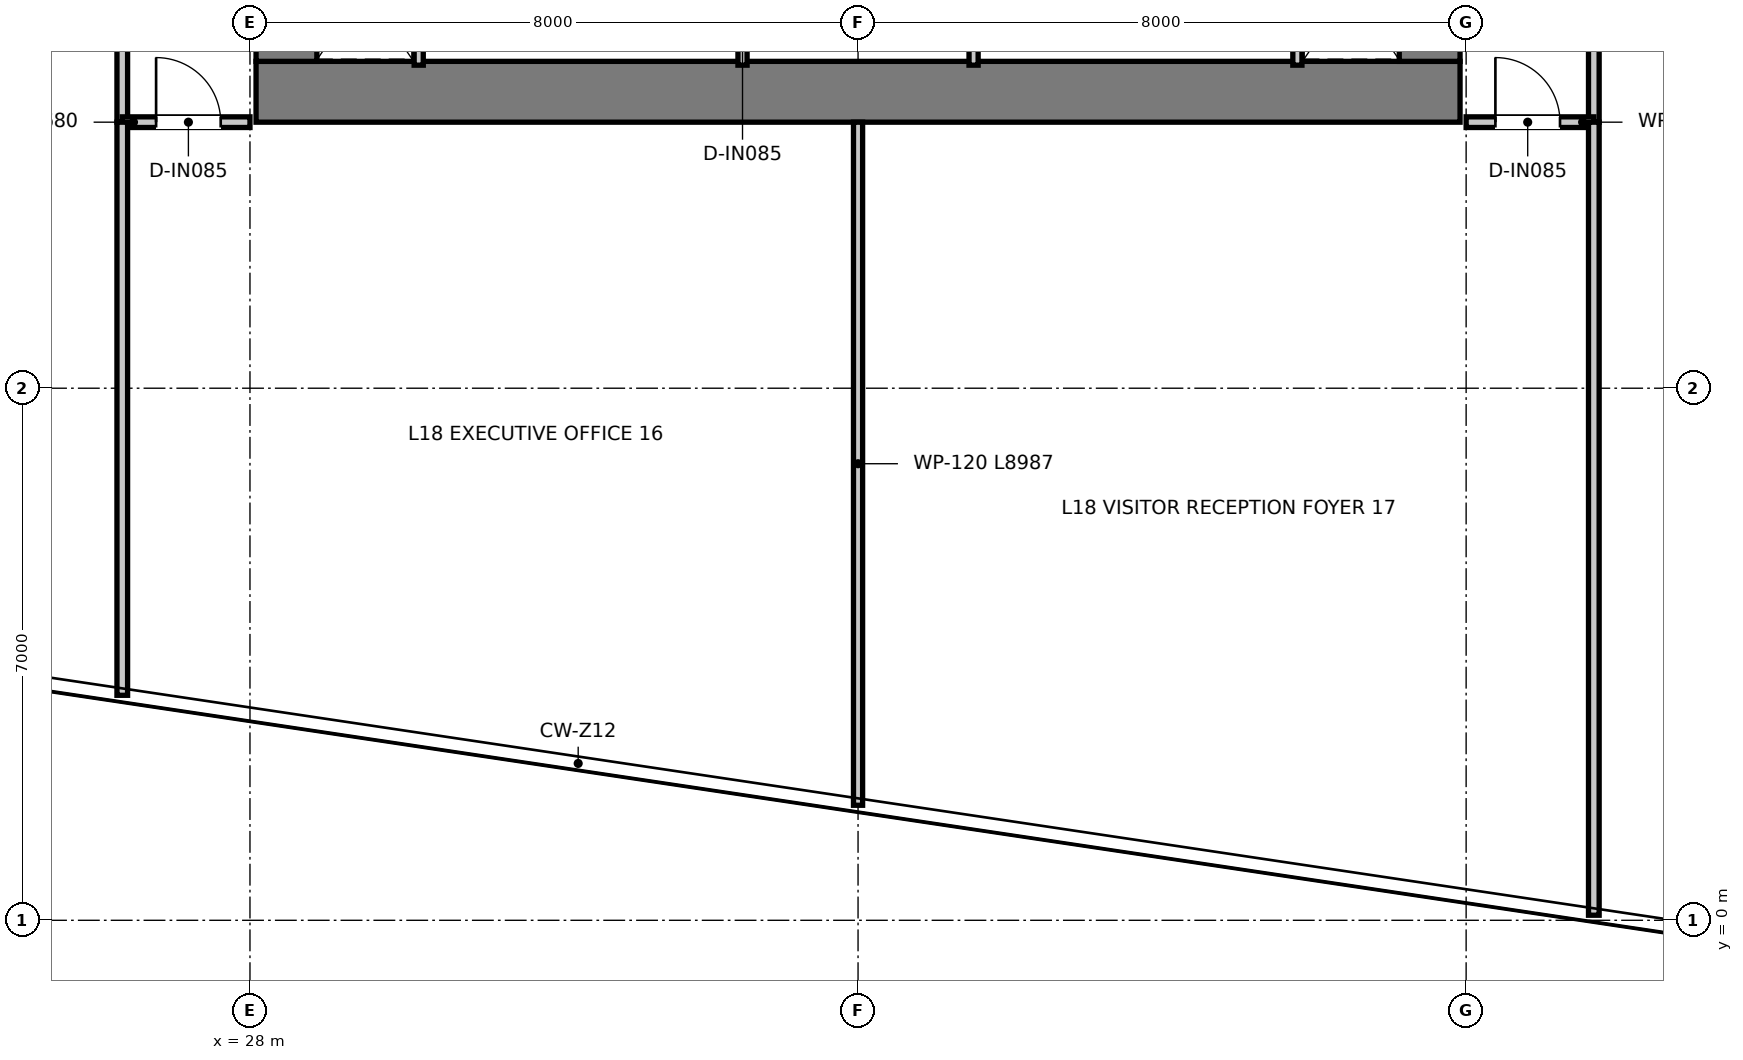
"""IFC4 building model, lengths in metres.
Left out: names, types, materials, properties, quantities, classifications, styles, units other than length and angle.
Written with IfcOpenShell. Run it as: python <this file> out.ifc"""

import sys

from ifc_helpers import new_model, si_unit, direction, frame, frame_2d, origin, place, context, subcontext, project, spatial, rectangle, extrude, element, fill, save


model = new_model("IFC4")
c1 = context("Model", 3, precision=1e-05, world=origin(), true_north=direction((0.0, 1.0)))
c2 = subcontext(c1, "Body", "Model", "MODEL_VIEW")
j1 = project(units=[si_unit("LENGTHUNIT", "METRE"), si_unit("PLANEANGLEUNIT", "RADIAN")], contexts=[c1])
p1 = place(None, origin())
s1 = spatial("IfcSite", under=j1, at=p1, CompositionType="ELEMENT")
p2 = place(p1, origin())
s2 = spatial("IfcBuilding", under=s1, at=p2, CompositionType="ELEMENT")
p3 = place(p2, frame((0.0, 0.0, 76.35)))
s3 = spatial("IfcBuildingStorey", under=s2, at=p3, CompositionType="ELEMENT", Elevation=76.35)
p4 = place(p3, frame((28.08, 10.9, 0.0), z_axis=(0.0, 0.0, 1.0), x_axis=(1.0, 0.0, 0.0)))
e1 = element("IfcWall", 1, at=p4, inside=s3, PredefinedType="SHEAR", context=c2, shape_type="SweptSolid", body=[
    extrude(rectangle(XDim=15.84, YDim=0.8, at=frame_2d((7.92, 0.0))), origin(), (0.0, 0.0, 1.0), 3.95),
])
for number, where, z_axis, x_axis in (
    (2, (28.48, 11.3, 0.0), (0.0, 0.0, 1.0), (0.0, 1.0, 0.0)),
    (3, (43.52, 11.3, 0.0), (0.0, 0.0, 1.0), (0.0, 1.0, 0.0)),
):
    element("IfcWall", number, at=place(p3, frame(where, z_axis=z_axis, x_axis=x_axis)), inside=s3, PredefinedType="SHEAR", context=c2, shape_type="SweptSolid", body=[
        extrude(rectangle(XDim=14.7, YDim=0.8, at=frame_2d((7.35, 0.0))), origin(), (0.0, 0.0, 1.0), 3.95),
    ])
for number, where, z_axis, x_axis in (
    (4, (30.22, 11.25, 0.0), (0.0, 0.0, 1.0), (0.0, 1.0, 0.0)),
    (5, (41.78, 11.25, 0.0), (0.0, 0.0, 1.0), (0.0, 1.0, 0.0)),
):
    element("IfcWall", number, at=place(p3, frame(where, z_axis=z_axis, x_axis=x_axis)), inside=s3, PredefinedType="PARTITIONING", context=c2, shape_type="SweptSolid", body=[
        extrude(rectangle(XDim=1.97, YDim=0.12, at=frame_2d((0.985, 0.0))), origin(), (0.0, 0.0, 1.0), 3.59),
    ])
p5 = place(p3, frame((34.48, 11.25, 0.0), z_axis=(0.0, 0.0, 1.0), x_axis=(0.0, 1.0, 0.0)))
e6 = element("IfcWall", 6, at=p5, inside=s3, PredefinedType="PARTITIONING", context=c2, shape_type="SweptSolid", body=[
    extrude(rectangle(XDim=1.97, YDim=0.12, at=frame_2d((0.985, 0.0))), origin(), (0.0, 0.0, 1.0), 3.59),
])
p6 = place(p5, frame((0.545, 0.0, 0.0)))
e7 = element("IfcOpeningElement", 7, at=p6, cuts=e6, PredefinedType="OPENING", context=c2, shape_type="SweptSolid", body=[
    extrude(rectangle(XDim=0.85, YDim=2.1, at=frame_2d((0.425, 1.05))), frame((0.0, 0.07, 0.0), z_axis=(0.0, -1.0, 0.0), x_axis=(1.0, 0.0, 0.0)), (0.0, 0.0, 1.0), 0.14),
])
p7 = place(p3, frame((37.52, 11.25, 0.0), z_axis=(0.0, 0.0, 1.0), x_axis=(0.0, 1.0, 0.0)))
e8 = element("IfcWall", 8, at=p7, inside=s3, PredefinedType="PARTITIONING", context=c2, shape_type="SweptSolid", body=[
    extrude(rectangle(XDim=1.97, YDim=0.12, at=frame_2d((0.985, 0.0))), origin(), (0.0, 0.0, 1.0), 3.59),
])
p8 = place(p7, frame((0.545, 0.0, 0.0)))
e9 = element("IfcOpeningElement", 9, at=p8, cuts=e8, PredefinedType="OPENING", context=c2, shape_type="SweptSolid", body=[
    extrude(rectangle(XDim=0.85, YDim=2.1, at=frame_2d((0.425, 1.05))), frame((0.0, 0.07, 0.0), z_axis=(0.0, -1.0, 0.0), x_axis=(1.0, 0.0, 0.0)), (0.0, 0.0, 1.0), 0.14),
])
p9 = place(p3, frame((26.32, 10.5, 0.0), z_axis=(0.0, 0.0, 1.0), x_axis=(0.0, 1.0, 0.0)))
e10 = element("IfcWall", 10, at=p9, inside=s3, PredefinedType="PARTITIONING", context=c2, shape_type="SweptSolid", body=[
    extrude(rectangle(XDim=25.62, YDim=0.14, at=frame_2d((12.81, 0.0))), origin(), (0.0, 0.0, 1.0), 2.89),
])
p10 = place(p9, frame((7.775, 0.0, 0.0)))
e11 = element("IfcOpeningElement", 11, at=p10, cuts=e10, PredefinedType="OPENING", context=c2, shape_type="SweptSolid", body=[
    extrude(rectangle(XDim=0.95, YDim=2.1, at=frame_2d((0.475, 1.05))), frame((0.0, 0.08, 0.0), z_axis=(0.0, -1.0, 0.0), x_axis=(1.0, 0.0, 0.0)), (0.0, 0.0, 1.0), 0.16),
])
p11 = place(p9, frame((11.275, 0.0, 0.0)))
e12 = element("IfcOpeningElement", 12, at=p11, cuts=e10, PredefinedType="OPENING", context=c2, shape_type="SweptSolid", body=[
    extrude(rectangle(XDim=0.95, YDim=2.1, at=frame_2d((0.475, 1.05))), frame((0.0, 0.08, 0.0), z_axis=(0.0, -1.0, 0.0), x_axis=(1.0, 0.0, 0.0)), (0.0, 0.0, 1.0), 0.16),
])
p12 = place(p9, frame((15.775, 0.0, 0.0)))
e13 = element("IfcOpeningElement", 13, at=p12, cuts=e10, PredefinedType="OPENING", context=c2, shape_type="SweptSolid", body=[
    extrude(rectangle(XDim=0.95, YDim=2.1, at=frame_2d((0.475, 1.05))), frame((0.0, 0.08, 0.0), z_axis=(0.0, -1.0, 0.0), x_axis=(1.0, 0.0, 0.0)), (0.0, 0.0, 1.0), 0.16),
])
p13 = place(p9, frame((20.125, 0.0, 0.0)))
e14 = element("IfcOpeningElement", 14, at=p13, cuts=e10, PredefinedType="OPENING", context=c2, shape_type="SweptSolid", body=[
    extrude(rectangle(XDim=0.95, YDim=2.1, at=frame_2d((0.475, 1.05))), frame((0.0, 0.08, 0.0), z_axis=(0.0, -1.0, 0.0), x_axis=(1.0, 0.0, 0.0)), (0.0, 0.0, 1.0), 0.16),
])
p14 = place(p9, frame((22.975, 0.0, 0.0)))
e15 = element("IfcOpeningElement", 15, at=p14, cuts=e10, PredefinedType="OPENING", context=c2, shape_type="SweptSolid", body=[
    extrude(rectangle(XDim=0.95, YDim=2.1, at=frame_2d((0.475, 1.05))), frame((0.0, 0.08, 0.0), z_axis=(0.0, -1.0, 0.0), x_axis=(1.0, 0.0, 0.0)), (0.0, 0.0, 1.0), 0.16),
])
p15 = place(p3, frame((45.68, 10.5, 0.0), z_axis=(0.0, 0.0, 1.0), x_axis=(0.0, 1.0, 0.0)))
e16 = element("IfcWall", 16, at=p15, inside=s3, PredefinedType="PARTITIONING", context=c2, shape_type="SweptSolid", body=[
    extrude(rectangle(XDim=25.62, YDim=0.14, at=frame_2d((12.81, 0.0))), origin(), (0.0, 0.0, 1.0), 2.89),
])
p16 = place(p15, frame((7.775, 0.0, 0.0)))
e17 = element("IfcOpeningElement", 17, at=p16, cuts=e16, PredefinedType="OPENING", context=c2, shape_type="SweptSolid", body=[
    extrude(rectangle(XDim=0.95, YDim=2.1, at=frame_2d((0.475, 1.05))), frame((0.0, 0.08, 0.0), z_axis=(0.0, -1.0, 0.0), x_axis=(1.0, 0.0, 0.0)), (0.0, 0.0, 1.0), 0.16),
])
p17 = place(p15, frame((11.275, 0.0, 0.0)))
e18 = element("IfcOpeningElement", 18, at=p17, cuts=e16, PredefinedType="OPENING", context=c2, shape_type="SweptSolid", body=[
    extrude(rectangle(XDim=0.95, YDim=2.1, at=frame_2d((0.475, 1.05))), frame((0.0, 0.08, 0.0), z_axis=(0.0, -1.0, 0.0), x_axis=(1.0, 0.0, 0.0)), (0.0, 0.0, 1.0), 0.16),
])
p18 = place(p15, frame((15.775, 0.0, 0.0)))
e19 = element("IfcOpeningElement", 19, at=p18, cuts=e16, PredefinedType="OPENING", context=c2, shape_type="SweptSolid", body=[
    extrude(rectangle(XDim=0.95, YDim=2.1, at=frame_2d((0.475, 1.05))), frame((0.0, 0.08, 0.0), z_axis=(0.0, -1.0, 0.0), x_axis=(1.0, 0.0, 0.0)), (0.0, 0.0, 1.0), 0.16),
])
p19 = place(p15, frame((20.125, 0.0, 0.0)))
e20 = element("IfcOpeningElement", 20, at=p19, cuts=e16, PredefinedType="OPENING", context=c2, shape_type="SweptSolid", body=[
    extrude(rectangle(XDim=0.95, YDim=2.1, at=frame_2d((0.475, 1.05))), frame((0.0, 0.08, 0.0), z_axis=(0.0, -1.0, 0.0), x_axis=(1.0, 0.0, 0.0)), (0.0, 0.0, 1.0), 0.16),
])
p20 = place(p15, frame((22.975, 0.0, 0.0)))
e21 = element("IfcOpeningElement", 21, at=p20, cuts=e16, PredefinedType="OPENING", context=c2, shape_type="SweptSolid", body=[
    extrude(rectangle(XDim=0.95, YDim=2.1, at=frame_2d((0.475, 1.05))), frame((0.0, 0.08, 0.0), z_axis=(0.0, -1.0, 0.0), x_axis=(1.0, 0.0, 0.0)), (0.0, 0.0, 1.0), 0.16),
])
p21 = place(p3, frame((26.32, 10.5, 0.0), z_axis=(0.0, 0.0, 1.0), x_axis=(1.0, 0.0, 0.0)))
e22 = element("IfcWall", 22, at=p21, inside=s3, PredefinedType="PARTITIONING", context=c2, shape_type="SweptSolid", body=[
    extrude(rectangle(XDim=1.68, YDim=0.14, at=frame_2d((0.84, 0.0))), origin(), (0.0, 0.0, 1.0), 3.59),
])
p22 = place(p21, frame((0.445, 0.0, 0.0)))
e23 = element("IfcOpeningElement", 23, at=p22, cuts=e22, PredefinedType="OPENING", context=c2, shape_type="SweptSolid", body=[
    extrude(rectangle(XDim=0.85, YDim=2.1, at=frame_2d((0.425, 1.05))), frame((0.0, 0.08, 0.0), z_axis=(0.0, -1.0, 0.0), x_axis=(1.0, 0.0, 0.0)), (0.0, 0.0, 1.0), 0.16),
])
p23 = place(p3, frame((44.0, 10.5, 0.0), z_axis=(0.0, 0.0, 1.0), x_axis=(1.0, 0.0, 0.0)))
e24 = element("IfcWall", 24, at=p23, inside=s3, PredefinedType="PARTITIONING", context=c2, shape_type="SweptSolid", body=[
    extrude(rectangle(XDim=1.68, YDim=0.14, at=frame_2d((0.84, 0.0))), origin(), (0.0, 0.0, 1.0), 3.59),
])
p24 = place(p23, frame((0.385, 0.0, 0.0)))
e25 = element("IfcOpeningElement", 25, at=p24, cuts=e24, PredefinedType="OPENING", context=c2, shape_type="SweptSolid", body=[
    extrude(rectangle(XDim=0.85, YDim=2.1, at=frame_2d((0.425, 1.05))), frame((0.0, 0.08, 0.0), z_axis=(0.0, -1.0, 0.0), x_axis=(1.0, 0.0, 0.0)), (0.0, 0.0, 1.0), 0.16),
])
p25 = place(p3, frame((26.32, 2.96, 0.0), z_axis=(0.0, 0.0, 1.0), x_axis=(0.0, 1.0, 0.0)))
e26 = element("IfcWall", 26, at=p25, inside=s3, PredefinedType="PARTITIONING", context=c2, shape_type="SweptSolid", body=[
    extrude(rectangle(XDim=7.54, YDim=0.14, at=frame_2d((3.77, 0.0))), origin(), (0.0, 0.0, 1.0), 3.59),
])
p26 = place(p3, frame((45.68, 0.067, 0.0), z_axis=(0.0, 0.0, 1.0), x_axis=(0.0, 1.0, 0.0)))
e27 = element("IfcWall", 27, at=p26, inside=s3, PredefinedType="PARTITIONING", context=c2, shape_type="SweptSolid", body=[
    extrude(rectangle(XDim=10.433, YDim=0.14, at=frame_2d((5.217, 0.0))), origin(), (0.0, 0.0, 1.0), 3.59),
])
p27 = place(p3, frame((36.0, 1.513, 0.0), z_axis=(0.0, 0.0, 1.0), x_axis=(0.0, 1.0, 0.0)))
e28 = element("IfcWall", 28, at=p27, inside=s3, PredefinedType="PARTITIONING", context=c2, shape_type="SweptSolid", body=[
    extrude(rectangle(XDim=8.987, YDim=0.12, at=frame_2d((4.493, 0.0))), origin(), (0.0, 0.0, 1.0), 3.59),
])
p28 = place(p22, origin())
e29 = element("IfcDoor", 29, at=p28, inside=s3, OperationType="SINGLE_SWING_LEFT", PredefinedType="DOOR", context=c2, shape_type="SweptSolid", body=[
    extrude(rectangle(XDim=0.85, YDim=2.1, at=frame_2d((0.425, 1.05))), frame((0.0, 0.025, 0.0), z_axis=(0.0, -1.0, 0.0), x_axis=(1.0, 0.0, 0.0)), (0.0, 0.0, 1.0), 0.05),
])
fill(e23, e29)
p29 = place(p24, origin())
e30 = element("IfcDoor", 30, at=p29, inside=s3, OperationType="SINGLE_SWING_LEFT", PredefinedType="DOOR", context=c2, shape_type="SweptSolid", body=[
    extrude(rectangle(XDim=0.85, YDim=2.1, at=frame_2d((0.425, 1.05))), frame((0.0, 0.025, 0.0), z_axis=(0.0, -1.0, 0.0), x_axis=(1.0, 0.0, 0.0)), (0.0, 0.0, 1.0), 0.05),
])
fill(e25, e30)
save(model, sys.argv[1])
